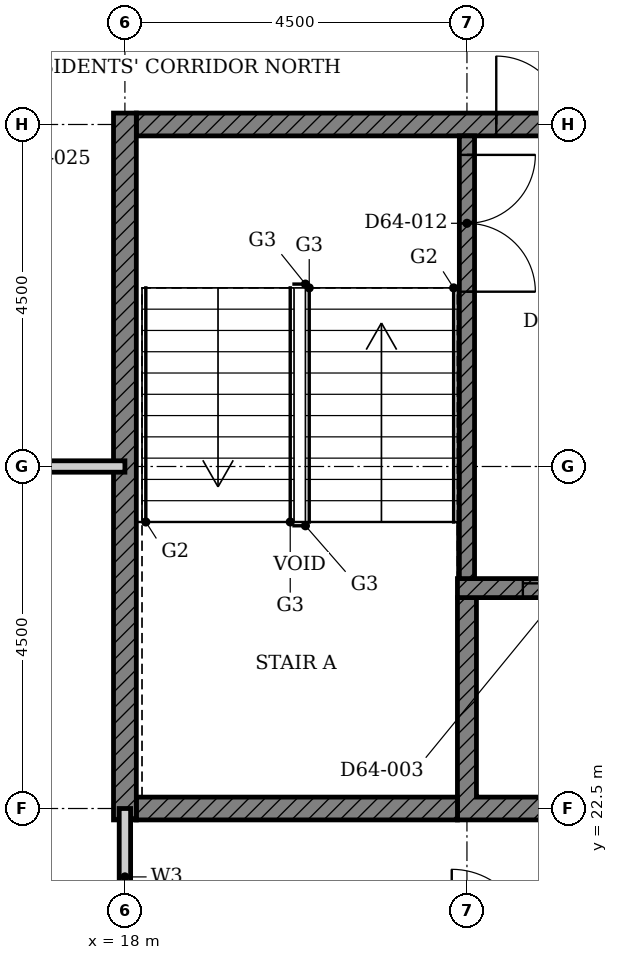
"""IFC4 building model, lengths in metres.
Left out: names, types, materials, properties, quantities, classifications, styles, units other than length and angle.
Written with IfcOpenShell. Run it as: python <this file> out.ifc"""

import sys

from ifc_helpers import new_model, si_unit, direction, frame, frame_2d, origin, place, context, subcontext, project, spatial, polyline, rectangle, outline, extrude, element, fill, save


model = new_model("IFC4")
c1 = context("Model", 3, precision=1e-05, world=origin(), true_north=direction((0.0, 1.0)))
c2 = subcontext(c1, "Body", "Model", "MODEL_VIEW")
j1 = project(units=[si_unit("LENGTHUNIT", "METRE"), si_unit("PLANEANGLEUNIT", "RADIAN")], contexts=[c1])
p1 = place(None, origin())
s1 = spatial("IfcSite", under=j1, at=p1, CompositionType="ELEMENT")
p2 = place(p1, origin())
s2 = spatial("IfcBuilding", under=s1, at=p2, CompositionType="ELEMENT")
p3 = place(p2, frame((0.0, 0.0, 252.7)))
s3 = spatial("IfcBuildingStorey", under=s2, at=p3, CompositionType="ELEMENT", Elevation=252.7)
p4 = place(p3, origin())
e1 = element("IfcWall", 1, at=p4, inside=s3, PredefinedType="SHEAR", context=c2, shape_type="SweptSolid", body=[
    extrude(outline(polyline([(22.375, 22.35), (25.197, 22.35), (25.197, 25.275), (24.947, 25.275), (24.947, 22.65), (22.625, 22.65), (22.625, 25.275), (22.375, 25.275), (22.375, 22.35)])), origin(), (0.0, 0.0, 1.0), 3.4),
])
p5 = place(p3, frame((18.15, 22.5, 0.0), z_axis=(0.0, 0.0, 1.0), x_axis=(1.0, 0.0, 0.0)))
e2 = element("IfcWall", 2, at=p5, inside=s3, PredefinedType="SHEAR", context=c2, shape_type="SweptSolid", body=[
    extrude(rectangle(XDim=4.225, YDim=0.3, at=frame_2d((2.113, 0.0))), origin(), (0.0, 0.0, 1.0), 3.4),
])
p6 = place(p3, frame((18.15, 31.5, 0.0), z_axis=(0.0, 0.0, 1.0), x_axis=(1.0, 0.0, 0.0)))
e3 = element("IfcWall", 3, at=p6, inside=s3, PredefinedType="SHEAR", context=c2, shape_type="SweptSolid", body=[
    extrude(rectangle(XDim=9.368, YDim=0.3, at=frame_2d((4.684, 0.0))), origin(), (0.0, 0.0, 1.0), 3.4),
])
p7 = place(p6, frame((4.736, 0.0, 0.0)))
e4 = element("IfcOpeningElement", 4, at=p7, cuts=e3, PredefinedType="OPENING", context=c2, shape_type="SweptSolid", body=[
    extrude(rectangle(XDim=1.8, YDim=2.1, at=frame_2d((0.9, 1.05))), frame((0.0, 0.16, 0.0), z_axis=(0.0, -1.0, 0.0), x_axis=(1.0, 0.0, 0.0)), (0.0, 0.0, 1.0), 0.32),
])
p8 = place(p3, frame((18.0, 22.35, 0.0), z_axis=(0.0, 0.0, 1.0), x_axis=(0.0, 1.0, 0.0)))
e5 = element("IfcWall", 5, at=p8, inside=s3, PredefinedType="SHEAR", context=c2, shape_type="SweptSolid", body=[
    extrude(rectangle(XDim=9.3, YDim=0.3, at=frame_2d((4.65, 0.0))), origin(), (0.0, 0.0, 1.0), 3.4),
])
p9 = place(p3, frame((22.375, 25.4, 0.0), z_axis=(0.0, 0.0, 1.0), x_axis=(1.0, 0.0, 0.0)))
e6 = element("IfcWall", 6, at=p9, inside=s3, PredefinedType="SHEAR", context=c2, shape_type="SweptSolid", body=[
    extrude(rectangle(XDim=15.678, YDim=0.25, at=frame_2d((7.839, 0.0))), origin(), (0.0, 0.0, 1.0), 3.4),
])
p10 = place(p9, frame((6.004, 0.0, 0.0)))
e7 = element("IfcOpeningElement", 7, at=p10, cuts=e6, PredefinedType="OPENING", context=c2, shape_type="SweptSolid", body=[
    extrude(rectangle(XDim=1.1, YDim=2.1, at=frame_2d((0.55, 1.05))), frame((0.0, 0.135, 0.0), z_axis=(0.0, -1.0, 0.0), x_axis=(1.0, 0.0, 0.0)), (0.0, 0.0, 1.0), 0.27),
])
p11 = place(p9, frame((0.861, 0.0, 0.0)))
e8 = element("IfcOpeningElement", 8, at=p11, cuts=e6, PredefinedType="OPENING", context=c2, shape_type="SweptSolid", body=[
    extrude(rectangle(XDim=1.1, YDim=2.1, at=frame_2d((0.55, 1.05))), frame((0.0, 0.135, 0.0), z_axis=(0.0, -1.0, 0.0), x_axis=(1.0, 0.0, 0.0)), (0.0, 0.0, 1.0), 0.27),
])
p12 = place(p9, frame((3.532, 0.0, 0.0)))
e9 = element("IfcOpeningElement", 9, at=p12, cuts=e6, PredefinedType="OPENING", context=c2, shape_type="SweptSolid", body=[
    extrude(rectangle(XDim=0.9, YDim=2.1, at=frame_2d((0.45, 1.05))), frame((0.0, 0.135, 0.0), z_axis=(0.0, -1.0, 0.0), x_axis=(1.0, 0.0, 0.0)), (0.0, 0.0, 1.0), 0.27),
])
p13 = place(p9, frame((9.961, 0.0, 0.0)))
e10 = element("IfcOpeningElement", 10, at=p13, cuts=e6, PredefinedType="OPENING", context=c2, shape_type="SweptSolid", body=[
    extrude(rectangle(XDim=0.9, YDim=2.1, at=frame_2d((0.45, 1.05))), frame((0.0, 0.135, 0.0), z_axis=(0.0, -1.0, 0.0), x_axis=(1.0, 0.0, 0.0)), (0.0, 0.0, 1.0), 0.27),
])
p14 = place(p9, frame((13.818, 0.0, 0.0)))
e11 = element("IfcOpeningElement", 11, at=p14, cuts=e6, PredefinedType="OPENING", context=c2, shape_type="SweptSolid", body=[
    extrude(rectangle(XDim=0.9, YDim=2.1, at=frame_2d((0.45, 1.05))), frame((0.0, 0.135, 0.0), z_axis=(0.0, -1.0, 0.0), x_axis=(1.0, 0.0, 0.0)), (0.0, 0.0, 1.0), 0.27),
])
p15 = place(p3, frame((22.5, 31.35, 0.0), z_axis=(0.0, 0.0, 1.0), x_axis=(0.0, -1.0, 0.0)))
e12 = element("IfcWall", 12, at=p15, inside=s3, PredefinedType="SHEAR", context=c2, shape_type="SweptSolid", body=[
    extrude(rectangle(XDim=5.825, YDim=0.2, at=frame_2d((2.913, 0.0))), origin(), (0.0, 0.0, 1.0), 3.4),
])
p16 = place(p15, frame((0.25, 0.0, 0.0)))
e13 = element("IfcOpeningElement", 13, at=p16, cuts=e12, PredefinedType="OPENING", context=c2, shape_type="SweptSolid", body=[
    extrude(rectangle(XDim=1.8, YDim=2.1, at=frame_2d((0.9, 1.05))), frame((0.0, 0.11, 0.0), z_axis=(0.0, -1.0, 0.0), x_axis=(1.0, 0.0, 0.0)), (0.0, 0.0, 1.0), 0.22),
])
p17 = place(p3, frame((4.5, 27.0, 0.0), z_axis=(0.0, 0.0, 1.0), x_axis=(1.0, 0.0, 0.0)))
e14 = element("IfcWall", 14, at=p17, inside=s3, PredefinedType="PARTITIONING", context=c2, shape_type="SweptSolid", body=[
    extrude(rectangle(XDim=13.5, YDim=0.15, at=frame_2d((6.75, 0.0))), origin(), (0.0, 0.0, 1.0), 2.68),
])
p18 = place(p17, frame((5.35, 0.0, 0.0)))
e15 = element("IfcOpeningElement", 15, at=p18, cuts=e14, PredefinedType="OPENING", context=c2, shape_type="SweptSolid", body=[
    extrude(rectangle(XDim=1.0, YDim=2.1, at=frame_2d((0.5, 1.05))), frame((0.0, 0.085, 0.0), z_axis=(0.0, -1.0, 0.0), x_axis=(1.0, 0.0, 0.0)), (0.0, 0.0, 1.0), 0.17),
])
p19 = place(p3, frame((18.0, 20.7, 0.0), z_axis=(0.0, 0.0, 1.0), x_axis=(0.0, 1.0, 0.0)))
e16 = element("IfcWall", 16, at=p19, inside=s3, PredefinedType="PARTITIONING", context=c2, shape_type="SweptSolid", body=[
    extrude(rectangle(XDim=1.8, YDim=0.15, at=frame_2d((0.9, 0.0))), origin(), (0.0, 0.0, 1.0), 3.4),
])
p20 = place(p11, origin())
e17 = element("IfcDoor", 17, at=p20, inside=s3, OperationType="DOUBLE_DOOR_SLIDING", PredefinedType="DOOR", context=c2, shape_type="SweptSolid", body=[
    extrude(rectangle(XDim=1.1, YDim=2.1, at=frame_2d((0.55, 1.05))), frame((0.0, 0.025, 0.0), z_axis=(0.0, -1.0, 0.0), x_axis=(1.0, 0.0, 0.0)), (0.0, 0.0, 1.0), 0.05),
])
fill(e8, e17)
p21 = place(p16, origin())
e18 = element("IfcDoor", 18, at=p21, inside=s3, OperationType="DOUBLE_DOOR_SINGLE_SWING", PredefinedType="DOOR", context=c2, shape_type="SweptSolid", body=[
    extrude(rectangle(XDim=1.8, YDim=2.1, at=frame_2d((0.9, 1.05))), frame((0.0, 0.025, 0.0), z_axis=(0.0, -1.0, 0.0), x_axis=(1.0, 0.0, 0.0)), (0.0, 0.0, 1.0), 0.05),
])
fill(e13, e18)
p22 = place(p7, origin())
e19 = element("IfcDoor", 19, at=p22, inside=s3, OperationType="DOUBLE_DOOR_SINGLE_SWING", PredefinedType="DOOR", context=c2, shape_type="SweptSolid", body=[
    extrude(rectangle(XDim=1.8, YDim=2.1, at=frame_2d((0.9, 1.05))), frame((0.0, 0.025, 0.0), z_axis=(0.0, -1.0, 0.0), x_axis=(1.0, 0.0, 0.0)), (0.0, 0.0, 1.0), 0.05),
])
fill(e4, e19)
save(model, sys.argv[1])
